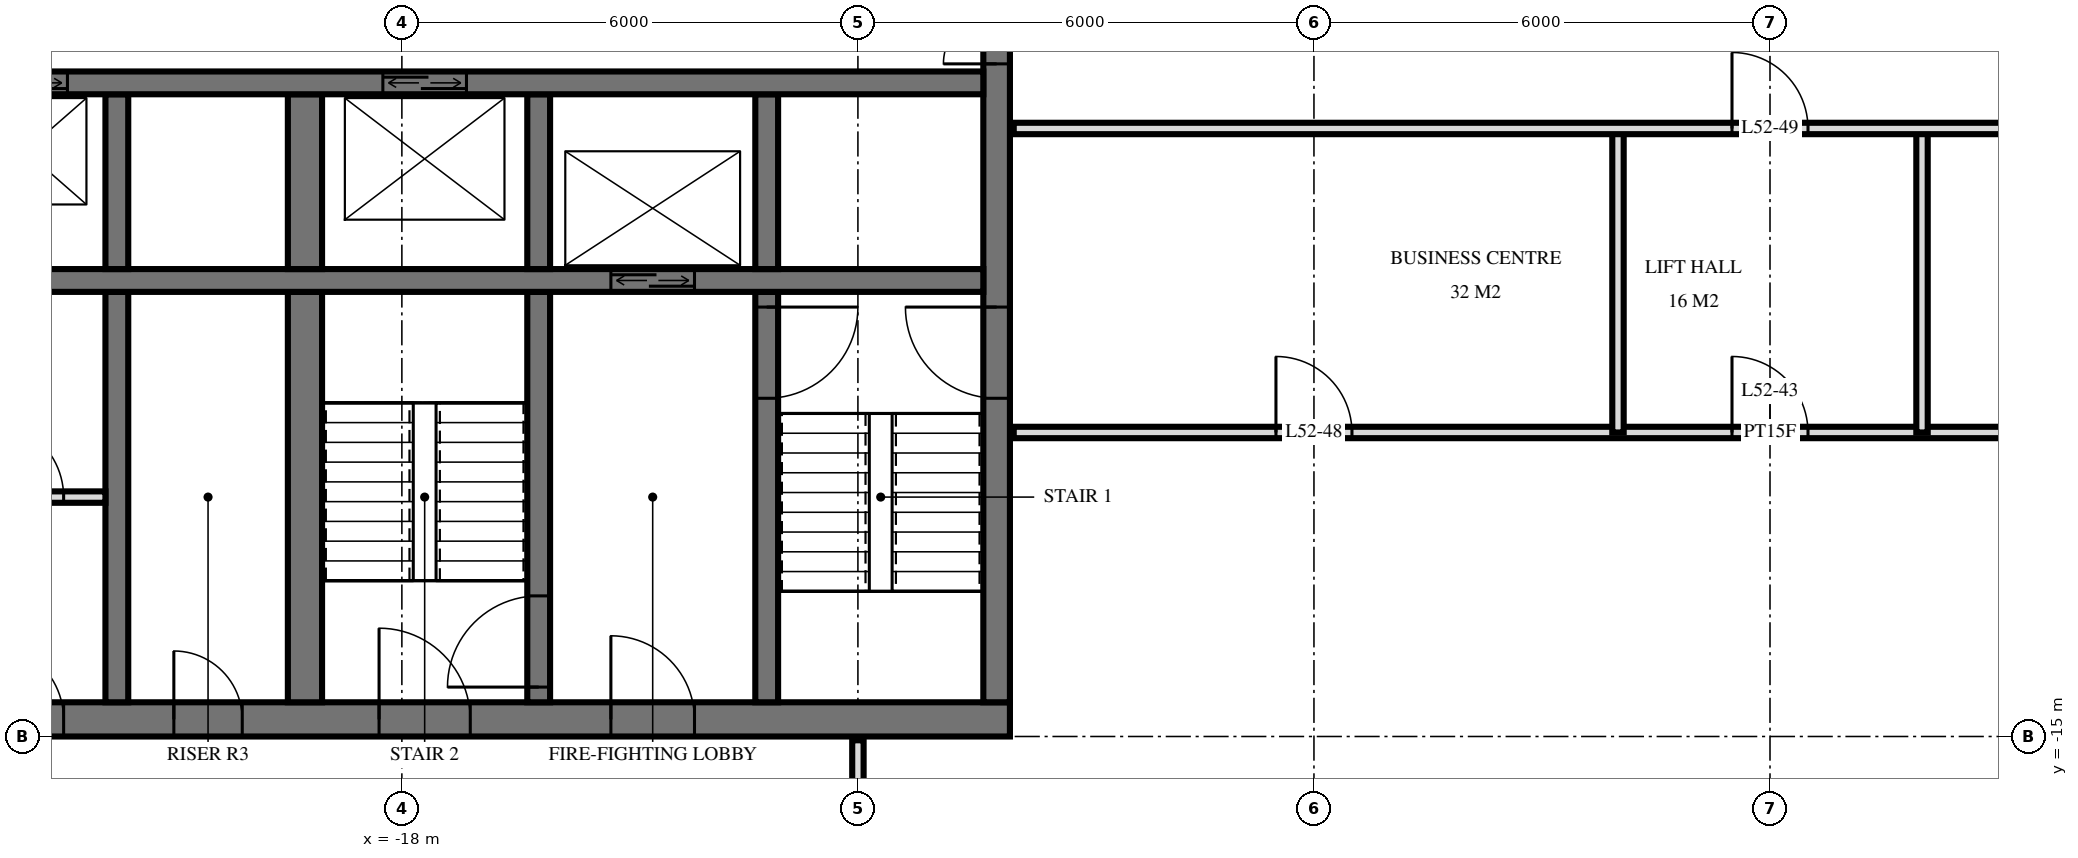
"""IFC4 building model, lengths in metres.
Left out: names, types, materials, properties, quantities, classifications, styles, units other than length and angle.
Written with IfcOpenShell. Run it as: python <this file> out.ifc"""

import sys

from ifc_helpers import new_model, si_unit, direction, frame, frame_2d, origin, place, context, subcontext, project, spatial, rectangle, extrude, element, fill, save


model = new_model("IFC4")
c1 = context("Model", 3, precision=1e-05, world=origin(), true_north=direction((0.0, 1.0)))
c2 = subcontext(c1, "Body", "Model", "MODEL_VIEW")
j1 = project(units=[si_unit("LENGTHUNIT", "METRE"), si_unit("PLANEANGLEUNIT", "RADIAN")], contexts=[c1])
p1 = place(None, origin())
s1 = spatial("IfcSite", under=j1, at=p1, CompositionType="ELEMENT")
p2 = place(p1, origin())
s2 = spatial("IfcBuilding", under=s1, at=p2, CompositionType="ELEMENT")
p3 = place(p2, frame((0.0, 0.0, 201.1)))
s3 = spatial("IfcBuildingStorey", under=s2, at=p3, CompositionType="ELEMENT", Elevation=201.1)
p4 = place(p3, frame((-24.5, -14.775, 0.0), z_axis=(0.0, 0.0, 1.0), x_axis=(1.0, 0.0, 0.0)))
e1 = element("IfcWall", 1, at=p4, inside=s3, PredefinedType="SHEAR", context=c2, shape_type="SweptSolid", body=[
    extrude(rectangle(XDim=14.5, YDim=0.45, at=frame_2d((7.25, 0.0))), origin(), (0.0, 0.0, 1.0), 3.5),
])
p5 = place(p4, frame((6.2, 0.0, 0.0)))
e2 = element("IfcOpeningElement", 2, at=p5, cuts=e1, PredefinedType="OPENING", context=c2, shape_type="SweptSolid", body=[
    extrude(rectangle(XDim=1.2, YDim=2.1, at=frame_2d((0.6, 1.05))), frame((0.0, 0.235, 0.0), z_axis=(0.0, -1.0, 0.0), x_axis=(1.0, 0.0, 0.0)), (0.0, 0.0, 1.0), 0.47),
])
p6 = place(p4, frame((9.25, 0.0, 0.0)))
e3 = element("IfcOpeningElement", 3, at=p6, cuts=e1, PredefinedType="OPENING", context=c2, shape_type="SweptSolid", body=[
    extrude(rectangle(XDim=1.1, YDim=2.1, at=frame_2d((0.55, 1.05))), frame((0.0, 0.235, 0.0), z_axis=(0.0, -1.0, 0.0), x_axis=(1.0, 0.0, 0.0)), (0.0, 0.0, 1.0), 0.47),
])
p7 = place(p4, frame((3.5, 0.0, 0.0)))
e4 = element("IfcOpeningElement", 4, at=p7, cuts=e1, PredefinedType="OPENING", context=c2, shape_type="SweptSolid", body=[
    extrude(rectangle(XDim=0.9, YDim=2.1, at=frame_2d((0.45, 1.05))), frame((0.0, 0.235, 0.0), z_axis=(0.0, -1.0, 0.0), x_axis=(1.0, 0.0, 0.0)), (0.0, 0.0, 1.0), 0.47),
])
p8 = place(p4, frame((1.05, 0.0, 0.0)))
e5 = element("IfcOpeningElement", 5, at=p8, cuts=e1, PredefinedType="OPENING", context=c2, shape_type="SweptSolid", body=[
    extrude(rectangle(XDim=1.0, YDim=2.1, at=frame_2d((0.5, 1.05))), frame((0.0, 0.235, 0.0), z_axis=(0.0, -1.0, 0.0), x_axis=(1.0, 0.0, 0.0)), (0.0, 0.0, 1.0), 0.47),
])
p9 = place(p3, frame((-10.175, -14.55, 0.0), z_axis=(0.0, 0.0, 1.0), x_axis=(0.0, 1.0, 0.0)))
e6 = element("IfcWall", 6, at=p9, inside=s3, PredefinedType="SHEAR", context=c2, shape_type="SweptSolid", body=[
    extrude(rectangle(XDim=14.1, YDim=0.35, at=frame_2d((7.05, 0.0))), origin(), (0.0, 0.0, 1.0), 3.5),
])
p10 = place(p9, frame((8.4, 0.0, 0.0)))
e7 = element("IfcOpeningElement", 7, at=p10, cuts=e6, PredefinedType="OPENING", context=c2, shape_type="SweptSolid", body=[
    extrude(rectangle(XDim=1.4, YDim=2.4, at=frame_2d((0.7, 1.2))), frame((0.0, 0.185, 0.0), z_axis=(0.0, -1.0, 0.0), x_axis=(1.0, 0.0, 0.0)), (0.0, 0.0, 1.0), 0.37),
])
p11 = place(p9, frame((10.0, 0.0, 0.0)))
e8 = element("IfcOpeningElement", 8, at=p11, cuts=e6, PredefinedType="OPENING", context=c2, shape_type="SweptSolid", body=[
    extrude(rectangle(XDim=1.4, YDim=2.4, at=frame_2d((0.7, 1.2))), frame((0.0, 0.185, 0.0), z_axis=(0.0, -1.0, 0.0), x_axis=(1.0, 0.0, 0.0)), (0.0, 0.0, 1.0), 0.37),
])
p12 = place(p9, frame((4.0, 0.0, 0.0)))
e9 = element("IfcOpeningElement", 9, at=p12, cuts=e6, PredefinedType="OPENING", context=c2, shape_type="SweptSolid", body=[
    extrude(rectangle(XDim=1.2, YDim=2.1, at=frame_2d((0.6, 1.05))), frame((0.0, 0.185, 0.0), z_axis=(0.0, -1.0, 0.0), x_axis=(1.0, 0.0, 0.0)), (0.0, 0.0, 1.0), 0.37),
])
p13 = place(p3, frame((-24.05, -6.4, 0.0), z_axis=(0.0, 0.0, 1.0), x_axis=(1.0, 0.0, 0.0)))
e10 = element("IfcWall", 10, at=p13, inside=s3, PredefinedType="SHEAR", context=c2, shape_type="SweptSolid", body=[
    extrude(rectangle(XDim=13.7, YDim=0.3, at=frame_2d((6.85, 0.0))), origin(), (0.0, 0.0, 1.0), 3.5),
])
p14 = place(p13, frame((0.55, 0.0, 0.0)))
e11 = element("IfcOpeningElement", 11, at=p14, cuts=e10, PredefinedType="OPENING", context=c2, shape_type="SweptSolid", body=[
    extrude(rectangle(XDim=1.1, YDim=2.1, at=frame_2d((0.55, 1.05))), frame((0.0, 0.16, 0.0), z_axis=(0.0, -1.0, 0.0), x_axis=(1.0, 0.0, 0.0)), (0.0, 0.0, 1.0), 0.32),
])
p15 = place(p13, frame((5.8, 0.0, 0.0)))
e12 = element("IfcOpeningElement", 12, at=p15, cuts=e10, PredefinedType="OPENING", context=c2, shape_type="SweptSolid", body=[
    extrude(rectangle(XDim=1.1, YDim=2.1, at=frame_2d((0.55, 1.05))), frame((0.0, 0.16, 0.0), z_axis=(0.0, -1.0, 0.0), x_axis=(1.0, 0.0, 0.0)), (0.0, 0.0, 1.0), 0.32),
])
p16 = place(p3, frame((-24.05, -9.0, 0.0), z_axis=(0.0, 0.0, 1.0), x_axis=(1.0, 0.0, 0.0)))
e13 = element("IfcWall", 13, at=p16, inside=s3, PredefinedType="SHEAR", context=c2, shape_type="SweptSolid", body=[
    extrude(rectangle(XDim=13.7, YDim=0.3, at=frame_2d((6.85, 0.0))), origin(), (0.0, 0.0, 1.0), 3.5),
])
p17 = place(p16, frame((8.8, 0.0, 0.0)))
e14 = element("IfcOpeningElement", 14, at=p17, cuts=e13, PredefinedType="OPENING", context=c2, shape_type="SweptSolid", body=[
    extrude(rectangle(XDim=1.1, YDim=2.1, at=frame_2d((0.55, 1.05))), frame((0.0, 0.16, 0.0), z_axis=(0.0, -1.0, 0.0), x_axis=(1.0, 0.0, 0.0)), (0.0, 0.0, 1.0), 0.32),
])
p18 = place(p3, frame((-13.2, -8.85, 0.0), z_axis=(0.0, 0.0, 1.0), x_axis=(0.0, 1.0, 0.0)))
e15 = element("IfcWall", 15, at=p18, inside=s3, PredefinedType="SHEAR", context=c2, shape_type="SweptSolid", body=[
    extrude(rectangle(XDim=2.3, YDim=0.3, at=frame_2d((1.15, 0.0))), origin(), (0.0, 0.0, 1.0), 3.5),
])
p19 = place(p3, frame((-13.2, -14.55, 0.0), z_axis=(0.0, 0.0, 1.0), x_axis=(0.0, 1.0, 0.0)))
e16 = element("IfcWall", 16, at=p19, inside=s3, PredefinedType="SHEAR", context=c2, shape_type="SweptSolid", body=[
    extrude(rectangle(XDim=5.4, YDim=0.3, at=frame_2d((2.7, 0.0))), origin(), (0.0, 0.0, 1.0), 3.5),
])
p20 = place(p19, frame((4.0, 0.0, 0.0)))
e17 = element("IfcOpeningElement", 17, at=p20, cuts=e16, PredefinedType="OPENING", context=c2, shape_type="SweptSolid", body=[
    extrude(rectangle(XDim=1.2, YDim=2.1, at=frame_2d((0.6, 1.05))), frame((0.0, 0.16, 0.0), z_axis=(0.0, -1.0, 0.0), x_axis=(1.0, 0.0, 0.0)), (0.0, 0.0, 1.0), 0.32),
])
p21 = place(p3, frame((-16.2, -8.85, 0.0), z_axis=(0.0, 0.0, 1.0), x_axis=(0.0, 1.0, 0.0)))
e18 = element("IfcWall", 18, at=p21, inside=s3, PredefinedType="SHEAR", context=c2, shape_type="SweptSolid", body=[
    extrude(rectangle(XDim=2.3, YDim=0.3, at=frame_2d((1.15, 0.0))), origin(), (0.0, 0.0, 1.0), 3.5),
])
p22 = place(p3, frame((-16.2, -14.55, 0.0), z_axis=(0.0, 0.0, 1.0), x_axis=(0.0, 1.0, 0.0)))
e19 = element("IfcWall", 19, at=p22, inside=s3, PredefinedType="SHEAR", context=c2, shape_type="SweptSolid", body=[
    extrude(rectangle(XDim=5.4, YDim=0.3, at=frame_2d((2.7, 0.0))), origin(), (0.0, 0.0, 1.0), 3.5),
])
p23 = place(p22, frame((0.2, 0.0, 0.0)))
e20 = element("IfcOpeningElement", 20, at=p23, cuts=e19, PredefinedType="OPENING", context=c2, shape_type="SweptSolid", body=[
    extrude(rectangle(XDim=1.2, YDim=2.1, at=frame_2d((0.6, 1.05))), frame((0.0, 0.16, 0.0), z_axis=(0.0, -1.0, 0.0), x_axis=(1.0, 0.0, 0.0)), (0.0, 0.0, 1.0), 0.32),
])
p24 = place(p3, frame((-19.275, -8.85, 0.0), z_axis=(0.0, 0.0, 1.0), x_axis=(0.0, 1.0, 0.0)))
e21 = element("IfcWall", 21, at=p24, inside=s3, PredefinedType="SHEAR", context=c2, shape_type="SweptSolid", body=[
    extrude(rectangle(XDim=2.3, YDim=0.45, at=frame_2d((1.15, 0.0))), origin(), (0.0, 0.0, 1.0), 3.5),
])
p25 = place(p3, frame((-19.275, -14.55, 0.0), z_axis=(0.0, 0.0, 1.0), x_axis=(0.0, 1.0, 0.0)))
e22 = element("IfcWall", 22, at=p25, inside=s3, PredefinedType="SHEAR", context=c2, shape_type="SweptSolid", body=[
    extrude(rectangle(XDim=5.4, YDim=0.45, at=frame_2d((2.7, 0.0))), origin(), (0.0, 0.0, 1.0), 3.5),
])
p26 = place(p3, frame((-21.75, -8.85, 0.0), z_axis=(0.0, 0.0, 1.0), x_axis=(0.0, 1.0, 0.0)))
e23 = element("IfcWall", 23, at=p26, inside=s3, PredefinedType="SHEAR", context=c2, shape_type="SweptSolid", body=[
    extrude(rectangle(XDim=2.3, YDim=0.3, at=frame_2d((1.15, 0.0))), origin(), (0.0, 0.0, 1.0), 3.5),
])
p27 = place(p3, frame((-21.75, -14.55, 0.0), z_axis=(0.0, 0.0, 1.0), x_axis=(0.0, 1.0, 0.0)))
e24 = element("IfcWall", 24, at=p27, inside=s3, PredefinedType="SHEAR", context=c2, shape_type="SweptSolid", body=[
    extrude(rectangle(XDim=5.4, YDim=0.3, at=frame_2d((2.7, 0.0))), origin(), (0.0, 0.0, 1.0), 3.5),
])
p28 = place(p3, frame((-24.0, -11.85, 0.0), z_axis=(0.0, 0.0, 1.0), x_axis=(1.0, 0.0, 0.0)))
e25 = element("IfcWall", 25, at=p28, inside=s3, PredefinedType="PARTITIONING", context=c2, shape_type="SweptSolid", body=[
    extrude(rectangle(XDim=2.1, YDim=0.15, at=frame_2d((1.05, 0.0))), origin(), (0.0, 0.0, 1.0), 3.2),
])
p29 = place(p28, frame((0.55, 0.0, 0.0)))
e26 = element("IfcOpeningElement", 26, at=p29, cuts=e25, PredefinedType="OPENING", context=c2, shape_type="SweptSolid", body=[
    extrude(rectangle(XDim=1.0, YDim=2.1, at=frame_2d((0.5, 1.05))), frame((0.0, 0.085, 0.0), z_axis=(0.0, -1.0, 0.0), x_axis=(1.0, 0.0, 0.0)), (0.0, 0.0, 1.0), 0.17),
])
for number, where, z_axis, x_axis in (
    (27, (2.0, -11.0, 0.0), (0.0, 0.0, 1.0), (0.0, 1.0, 0.0)),
    (28, (-2.0, -11.0, 0.0), (0.0, 0.0, 1.0), (0.0, 1.0, 0.0)),
):
    element("IfcWall", number, at=place(p3, frame(where, z_axis=z_axis, x_axis=x_axis)), inside=s3, PredefinedType="PARTITIONING", context=c2, shape_type="SweptSolid", body=[
        extrude(rectangle(XDim=4.0, YDim=0.15, at=frame_2d((2.0, 0.0))), origin(), (0.0, 0.0, 1.0), 3.22),
    ])
p30 = place(p3, frame((-12.0, -18.0, 0.0), z_axis=(0.0, 0.0, 1.0), x_axis=(0.0, 1.0, 0.0)))
e29 = element("IfcWall", 29, at=p30, inside=s3, PredefinedType="PARTITIONING", context=c2, shape_type="SweptSolid", body=[
    extrude(rectangle(XDim=2.95, YDim=0.15, at=frame_2d((1.475, 0.0))), origin(), (0.0, 0.0, 1.0), 3.22),
])
p31 = place(p30, frame((1.0, 0.0, 0.0)))
e30 = element("IfcOpeningElement", 30, at=p31, cuts=e29, PredefinedType="OPENING", context=c2, shape_type="SweptSolid", body=[
    extrude(rectangle(XDim=1.0, YDim=2.1, at=frame_2d((0.5, 1.05))), frame((0.0, 0.085, 0.0), z_axis=(0.0, -1.0, 0.0), x_axis=(1.0, 0.0, 0.0)), (0.0, 0.0, 1.0), 0.17),
])
p32 = place(p3, frame((-9.95, -11.0, 0.0), z_axis=(0.0, 0.0, 1.0), x_axis=(1.0, 0.0, 0.0)))
e31 = element("IfcWall", 31, at=p32, inside=s3, PredefinedType="PARTITIONING", context=c2, shape_type="SweptSolid", body=[
    extrude(rectangle(XDim=19.9, YDim=0.15, at=frame_2d((9.95, 0.0))), origin(), (0.0, 0.0, 1.0), 3.22),
])
p33 = place(p32, frame((9.45, 0.0, 0.0)))
e32 = element("IfcOpeningElement", 32, at=p33, cuts=e31, PredefinedType="OPENING", context=c2, shape_type="SweptSolid", body=[
    extrude(rectangle(XDim=1.0, YDim=2.1, at=frame_2d((0.5, 1.05))), frame((0.0, 0.085, 0.0), z_axis=(0.0, -1.0, 0.0), x_axis=(1.0, 0.0, 0.0)), (0.0, 0.0, 1.0), 0.17),
])
p34 = place(p32, frame((3.45, 0.0, 0.0)))
e33 = element("IfcOpeningElement", 33, at=p34, cuts=e31, PredefinedType="OPENING", context=c2, shape_type="SweptSolid", body=[
    extrude(rectangle(XDim=1.0, YDim=2.1, at=frame_2d((0.5, 1.05))), frame((0.0, 0.085, 0.0), z_axis=(0.0, -1.0, 0.0), x_axis=(1.0, 0.0, 0.0)), (0.0, 0.0, 1.0), 0.17),
])
p35 = place(p3, frame((-9.95, -7.0, 0.0), z_axis=(0.0, 0.0, 1.0), x_axis=(1.0, 0.0, 0.0)))
e34 = element("IfcWall", 34, at=p35, inside=s3, PredefinedType="PARTITIONING", context=c2, shape_type="SweptSolid", body=[
    extrude(rectangle(XDim=19.9, YDim=0.15, at=frame_2d((9.95, 0.0))), origin(), (0.0, 0.0, 1.0), 3.22),
])
p36 = place(p35, frame((9.45, 0.0, 0.0)))
e35 = element("IfcOpeningElement", 35, at=p36, cuts=e34, PredefinedType="OPENING", context=c2, shape_type="SweptSolid", body=[
    extrude(rectangle(XDim=1.0, YDim=2.1, at=frame_2d((0.5, 1.05))), frame((0.0, 0.085, 0.0), z_axis=(0.0, -1.0, 0.0), x_axis=(1.0, 0.0, 0.0)), (0.0, 0.0, 1.0), 0.17),
])
p37 = place(p35, frame((15.45, 0.0, 0.0)))
e36 = element("IfcOpeningElement", 36, at=p37, cuts=e34, PredefinedType="OPENING", context=c2, shape_type="SweptSolid", body=[
    extrude(rectangle(XDim=1.0, YDim=2.1, at=frame_2d((0.5, 1.05))), frame((0.0, 0.085, 0.0), z_axis=(0.0, -1.0, 0.0), x_axis=(1.0, 0.0, 0.0)), (0.0, 0.0, 1.0), 0.17),
])
p38 = place(p14, origin())
e37 = element("IfcDoor", 37, at=p38, inside=s3, OperationType="DOUBLE_DOOR_SLIDING", PredefinedType="USERDEFINED", context=c2, shape_type="SweptSolid", body=[
    extrude(rectangle(XDim=1.1, YDim=2.1, at=frame_2d((0.55, 1.05))), frame((0.0, 0.025, 0.0), z_axis=(0.0, -1.0, 0.0), x_axis=(1.0, 0.0, 0.0)), (0.0, 0.0, 1.0), 0.05),
])
fill(e11, e37)
p39 = place(p17, origin())
e38 = element("IfcDoor", 38, at=p39, inside=s3, OperationType="DOUBLE_DOOR_SLIDING", PredefinedType="USERDEFINED", context=c2, shape_type="SweptSolid", body=[
    extrude(rectangle(XDim=1.1, YDim=2.1, at=frame_2d((0.55, 1.05))), frame((0.0, 0.025, 0.0), z_axis=(0.0, -1.0, 0.0), x_axis=(1.0, 0.0, 0.0)), (0.0, 0.0, 1.0), 0.05),
])
fill(e14, e38)
p40 = place(p15, origin())
e39 = element("IfcDoor", 39, at=p40, inside=s3, OperationType="DOUBLE_DOOR_SLIDING", PredefinedType="USERDEFINED", context=c2, shape_type="SweptSolid", body=[
    extrude(rectangle(XDim=1.1, YDim=2.1, at=frame_2d((0.55, 1.05))), frame((0.0, 0.025, 0.0), z_axis=(0.0, -1.0, 0.0), x_axis=(1.0, 0.0, 0.0)), (0.0, 0.0, 1.0), 0.05),
])
fill(e12, e39)
p41 = place(p10, origin())
e40 = element("IfcDoor", 40, at=p41, inside=s3, OperationType="DOUBLE_DOOR_SINGLE_SWING", PredefinedType="DOOR", context=c2, shape_type="SweptSolid", body=[
    extrude(rectangle(XDim=1.4, YDim=2.4, at=frame_2d((0.7, 1.2))), frame((0.0, 0.025, 0.0), z_axis=(0.0, -1.0, 0.0), x_axis=(1.0, 0.0, 0.0)), (0.0, 0.0, 1.0), 0.05),
])
fill(e7, e40)
p42 = place(p12, origin())
e41 = element("IfcDoor", 41, at=p42, inside=s3, OperationType="SINGLE_SWING_LEFT", PredefinedType="DOOR", context=c2, shape_type="SweptSolid", body=[
    extrude(rectangle(XDim=1.2, YDim=2.1, at=frame_2d((0.6, 1.05))), frame((0.0, 0.025, 0.0), z_axis=(0.0, -1.0, 0.0), x_axis=(1.0, 0.0, 0.0)), (0.0, 0.0, 1.0), 0.05),
])
fill(e9, e41)
p43 = place(p5, origin())
e42 = element("IfcDoor", 42, at=p43, inside=s3, OperationType="SINGLE_SWING_RIGHT", PredefinedType="DOOR", context=c2, shape_type="SweptSolid", body=[
    extrude(rectangle(XDim=1.2, YDim=2.1, at=frame_2d((0.6, 1.05))), frame((0.0, 0.025, 0.0), z_axis=(0.0, -1.0, 0.0), x_axis=(1.0, 0.0, 0.0)), (0.0, 0.0, 1.0), 0.05),
])
fill(e2, e42)
p44 = place(p6, origin())
e43 = element("IfcDoor", 43, at=p44, inside=s3, OperationType="SINGLE_SWING_RIGHT", PredefinedType="DOOR", context=c2, shape_type="SweptSolid", body=[
    extrude(rectangle(XDim=1.1, YDim=2.1, at=frame_2d((0.55, 1.05))), frame((0.0, 0.025, 0.0), z_axis=(0.0, -1.0, 0.0), x_axis=(1.0, 0.0, 0.0)), (0.0, 0.0, 1.0), 0.05),
])
fill(e3, e43)
p45 = place(p7, origin())
e44 = element("IfcDoor", 44, at=p45, inside=s3, OperationType="SINGLE_SWING_RIGHT", PredefinedType="DOOR", context=c2, shape_type="SweptSolid", body=[
    extrude(rectangle(XDim=0.9, YDim=2.1, at=frame_2d((0.45, 1.05))), frame((0.0, 0.025, 0.0), z_axis=(0.0, -1.0, 0.0), x_axis=(1.0, 0.0, 0.0)), (0.0, 0.0, 1.0), 0.05),
])
fill(e4, e44)
p46 = place(p8, origin())
e45 = element("IfcDoor", 45, at=p46, inside=s3, OperationType="SINGLE_SWING_RIGHT", PredefinedType="DOOR", context=c2, shape_type="SweptSolid", body=[
    extrude(rectangle(XDim=1.0, YDim=2.1, at=frame_2d((0.5, 1.05))), frame((0.0, 0.025, 0.0), z_axis=(0.0, -1.0, 0.0), x_axis=(1.0, 0.0, 0.0)), (0.0, 0.0, 1.0), 0.05),
])
fill(e5, e45)
p47 = place(p20, frame((0.6, 0.0, 0.0), z_axis=(0.0, 0.0, 1.0), x_axis=(-1.0, 0.0, 0.0)))
e46 = element("IfcDoor", 46, at=p47, inside=s3, OperationType="SINGLE_SWING_RIGHT", PredefinedType="DOOR", context=c2, shape_type="SweptSolid", body=[
    extrude(rectangle(XDim=1.2, YDim=2.1, at=frame_2d((0.0, 1.05))), frame((0.0, -0.025, 0.0), z_axis=(0.0, 1.0, 0.0), x_axis=(-1.0, 0.0, 0.0)), (0.0, 0.0, 1.0), 0.05),
])
fill(e17, e46)
p48 = place(p23, origin())
e47 = element("IfcDoor", 47, at=p48, inside=s3, OperationType="SINGLE_SWING_RIGHT", PredefinedType="DOOR", context=c2, shape_type="SweptSolid", body=[
    extrude(rectangle(XDim=1.2, YDim=2.1, at=frame_2d((0.6, 1.05))), frame((0.0, 0.025, 0.0), z_axis=(0.0, -1.0, 0.0), x_axis=(1.0, 0.0, 0.0)), (0.0, 0.0, 1.0), 0.05),
])
fill(e20, e47)
p49 = place(p29, origin())
e48 = element("IfcDoor", 48, at=p49, inside=s3, OperationType="SINGLE_SWING_RIGHT", PredefinedType="DOOR", context=c2, shape_type="SweptSolid", body=[
    extrude(rectangle(XDim=1.0, YDim=2.1, at=frame_2d((0.5, 1.05))), frame((0.0, 0.025, 0.0), z_axis=(0.0, -1.0, 0.0), x_axis=(1.0, 0.0, 0.0)), (0.0, 0.0, 1.0), 0.05),
])
fill(e26, e48)
p50 = place(p33, origin())
e49 = element("IfcDoor", 49, at=p50, inside=s3, OperationType="SINGLE_SWING_RIGHT", PredefinedType="DOOR", context=c2, shape_type="SweptSolid", body=[
    extrude(rectangle(XDim=1.0, YDim=2.1, at=frame_2d((0.5, 1.05))), frame((0.0, 0.025, 0.0), z_axis=(0.0, -1.0, 0.0), x_axis=(1.0, 0.0, 0.0)), (0.0, 0.0, 1.0), 0.05),
])
fill(e32, e49)
p51 = place(p34, origin())
e50 = element("IfcDoor", 50, at=p51, inside=s3, OperationType="SINGLE_SWING_RIGHT", PredefinedType="DOOR", context=c2, shape_type="SweptSolid", body=[
    extrude(rectangle(XDim=1.0, YDim=2.1, at=frame_2d((0.5, 1.05))), frame((0.0, 0.025, 0.0), z_axis=(0.0, -1.0, 0.0), x_axis=(1.0, 0.0, 0.0)), (0.0, 0.0, 1.0), 0.05),
])
fill(e33, e50)
p52 = place(p36, origin())
e51 = element("IfcDoor", 51, at=p52, inside=s3, OperationType="SINGLE_SWING_RIGHT", PredefinedType="DOOR", context=c2, shape_type="SweptSolid", body=[
    extrude(rectangle(XDim=1.0, YDim=2.1, at=frame_2d((0.5, 1.05))), frame((0.0, 0.025, 0.0), z_axis=(0.0, -1.0, 0.0), x_axis=(1.0, 0.0, 0.0)), (0.0, 0.0, 1.0), 0.05),
])
fill(e35, e51)
save(model, sys.argv[1])
